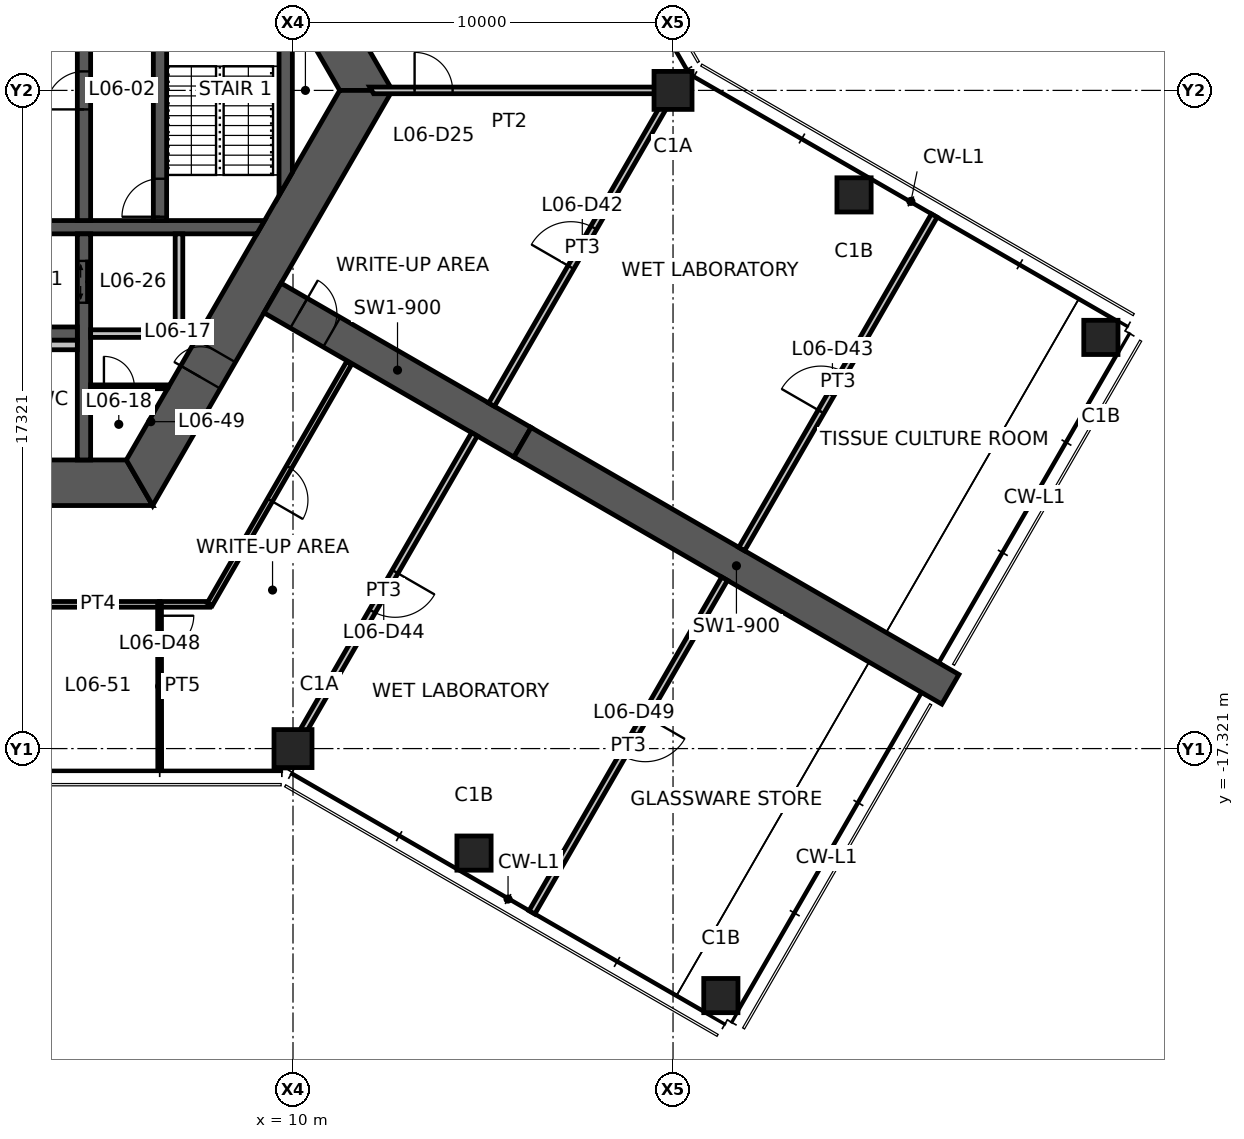
"""IFC4 building model, lengths in metres.
Left out: names, types, materials, properties, quantities, classifications, styles, units other than length and angle.
Written with IfcOpenShell. Run it as: python <this file> out.ifc"""

import sys

from ifc_helpers import new_model, si_unit, direction, frame, frame_2d, origin, origin_2d, place, context, subcontext, project, spatial, polyline, rectangle, hollow_rectangle, outline, extrude, element, fill, save


model = new_model("IFC4")
c1 = context("Model", 3, precision=1e-05, world=origin(), true_north=direction((0.0, 1.0)))
c2 = subcontext(c1, "Body", "Model", "MODEL_VIEW")
j1 = project(units=[si_unit("LENGTHUNIT", "METRE"), si_unit("PLANEANGLEUNIT", "RADIAN")], contexts=[c1])
p1 = place(None, origin())
s1 = spatial("IfcSite", under=j1, at=p1, CompositionType="ELEMENT")
p2 = place(p1, origin())
s2 = spatial("IfcBuilding", under=s1, at=p2, CompositionType="ELEMENT")
p3 = place(p2, frame((0.0, 0.0, 22.6)))
s3 = spatial("IfcBuildingStorey", under=s2, at=p3, CompositionType="ELEMENT", Elevation=22.6)
for number, where, z_axis, x_axis in (
    (1, (20.0, 0.0, 0.0), (0.0, 0.0, 1.0), (1.0, 0.0, 0.0)),
    (2, (10.0, -17.321, 0.0), (0.0, 0.0, 1.0), (1.0, 0.0, 0.0)),
):
    element("IfcColumn", number, at=place(p3, frame(where, z_axis=z_axis, x_axis=x_axis)), inside=s3, PredefinedType="COLUMN", context=c2, shape_type="SweptSolid", body=[
        extrude(hollow_rectangle(XDim=1.0, YDim=1.0, WallThickness=0.06, at=origin_2d()), origin(), (0.0, 0.0, 1.0), 4.2),
    ])
for number, where, z_axis, x_axis in (
    (3, (14.763, -20.071, 0.0), (0.0, 0.0, 1.0), (1.0, 0.0, 0.0)),
    (4, (21.258, -23.821, 0.0), (0.0, 0.0, 1.0), (1.0, 0.0, 0.0)),
    (5, (24.763, -2.75, 0.0), (0.0, 0.0, 1.0), (1.0, 0.0, 0.0)),
    (6, (31.258, -6.5, 0.0), (0.0, 0.0, 1.0), (1.0, 0.0, 0.0)),
):
    element("IfcColumn", number, at=place(p3, frame(where, z_axis=z_axis, x_axis=x_axis)), inside=s3, PredefinedType="COLUMN", context=c2, shape_type="SweptSolid", body=[
        extrude(hollow_rectangle(XDim=0.9, YDim=0.9, WallThickness=0.05, at=origin_2d()), origin(), (0.0, 0.0, 1.0), 4.2),
    ])
p4 = place(p3, frame((11.922, 0.0, 0.0), z_axis=(0.0, 0.0, 1.0), x_axis=(-0.500004296715, 0.866022923061, 0.0)))
e7 = element("IfcWall", 7, at=p4, inside=s3, PredefinedType="SHEAR", context=c2, shape_type="SweptSolid", body=[
    extrude(outline(polyline([(-0.346, -0.6), (5.835, -0.6), (6.635, -0.6), (12.269, -0.6), (11.576, 0.6), (6.635, 0.6), (5.835, 0.6), (0.346, 0.6), (-0.346, -0.6)])), origin(), (0.0, 0.0, 1.0), 4.2),
])
p5 = place(p4, frame((5.835, 0.0, 0.0)))
e8 = element("IfcOpeningElement", 8, at=p5, cuts=e7, PredefinedType="OPENING", context=c2, shape_type="SweptSolid", body=[
    extrude(rectangle(XDim=0.8, YDim=2.1, at=frame_2d((0.4, 1.05))), frame((0.0, 0.61, 0.0), z_axis=(0.0, -1.0, 0.0), x_axis=(1.0, 0.0, 0.0)), (0.0, 0.0, 1.0), 1.22),
])
p6 = place(p3, frame((-5.961, -10.325, 0.0), z_axis=(0.0, 0.0, 1.0), x_axis=(1.0, 0.0, 0.0)))
e9 = element("IfcWall", 9, at=p6, inside=s3, PredefinedType="SHEAR", context=c2, shape_type="SweptSolid", body=[
    extrude(outline(polyline([(-0.346, -0.6), (5.461, -0.6), (6.461, -0.6), (12.269, -0.6), (11.576, 0.6), (6.461, 0.6), (5.461, 0.6), (0.346, 0.6), (-0.346, -0.6)])), origin(), (0.0, 0.0, 1.0), 4.2),
])
p7 = place(p6, frame((5.461, 0.0, 0.0)))
e10 = element("IfcOpeningElement", 10, at=p7, cuts=e9, PredefinedType="OPENING", context=c2, shape_type="SweptSolid", body=[
    extrude(rectangle(XDim=1.0, YDim=2.1, at=frame_2d((0.5, 1.05))), frame((0.0, 0.61, 0.0), z_axis=(0.0, -1.0, 0.0), x_axis=(1.0, 0.0, 0.0)), (0.0, 0.0, 1.0), 1.22),
])
p8 = place(p3, frame((5.961, -10.325, 0.0), z_axis=(0.0, 0.0, 1.0), x_axis=(0.500004296715, 0.866022923061, 0.0)))
e11 = element("IfcWall", 11, at=p8, inside=s3, PredefinedType="SHEAR", context=c2, shape_type="SweptSolid", body=[
    extrude(outline(polyline([(-0.346, -0.6), (3.208, -0.6), (4.009, -0.6), (12.269, -0.6), (11.576, 0.6), (4.009, 0.6), (3.208, 0.6), (0.346, 0.6), (-0.346, -0.6)])), origin(), (0.0, 0.0, 1.0), 4.2),
])
p9 = place(p8, frame((3.208, 0.0, 0.0)))
e12 = element("IfcOpeningElement", 12, at=p9, cuts=e11, PredefinedType="OPENING", context=c2, shape_type="SweptSolid", body=[
    extrude(rectangle(XDim=0.8, YDim=2.1, at=frame_2d((0.4, 1.05))), frame((0.0, 0.61, 0.0), z_axis=(0.0, -1.0, 0.0), x_axis=(1.0, 0.0, 0.0)), (0.0, 0.0, 1.0), 1.22),
])
p10 = place(p3, frame((9.461, -5.462, 0.0), z_axis=(0.0, 0.0, 1.0), x_axis=(0.866019116917, -0.500010889016, 0.0)))
e13 = element("IfcWall", 13, at=p10, inside=s3, PredefinedType="SHEAR", context=c2, shape_type="SweptSolid", body=[
    extrude(rectangle(XDim=7.595, YDim=0.9, at=frame_2d((3.798, 0.0))), origin(), (0.0, 0.0, 1.0), 4.2),
])
p11 = place(p10, frame((0.8, 0.0, 0.0)))
e14 = element("IfcOpeningElement", 14, at=p11, cuts=e13, PredefinedType="OPENING", context=c2, shape_type="SweptSolid", body=[
    extrude(rectangle(XDim=1.0, YDim=2.1, at=frame_2d((0.5, 1.05))), frame((0.0, 0.46, 0.0), z_axis=(0.0, -1.0, 0.0), x_axis=(1.0, 0.0, 0.0)), (0.0, 0.0, 1.0), 0.92),
])
p12 = place(p3, frame((16.039, -9.26, 0.0), z_axis=(0.0, 0.0, 1.0), x_axis=(0.866024837091, -0.50000098154, 0.0)))
e15 = element("IfcWall", 15, at=p12, inside=s3, PredefinedType="SHEAR", context=c2, shape_type="SweptSolid", body=[
    extrude(rectangle(XDim=13.0, YDim=0.9, at=frame_2d((6.5, 0.0))), origin(), (0.0, 0.0, 1.0), 4.2),
])
p13 = place(p3, frame((1.425, -3.6, 0.0), z_axis=(0.0, 0.0, 1.0), x_axis=(1.0, 0.0, 0.0)))
e16 = element("IfcWall", 16, at=p13, inside=s3, PredefinedType="SHEAR", context=c2, shape_type="SweptSolid", body=[
    extrude(outline(polyline([(0.0, -0.175), (1.125, -0.175), (2.125, -0.175), (7.625, -0.175), (7.827, 0.175), (2.125, 0.175), (1.125, 0.175), (0.0, 0.175), (0.0, -0.175)])), origin(), (0.0, 0.0, 1.0), 4.2),
])
p14 = place(p13, frame((1.125, 0.0, 0.0)))
e17 = element("IfcOpeningElement", 17, at=p14, cuts=e16, PredefinedType="OPENING", context=c2, shape_type="SweptSolid", body=[
    extrude(rectangle(XDim=1.0, YDim=2.1, at=frame_2d((0.5, 1.05))), frame((0.0, 0.185, 0.0), z_axis=(0.0, -1.0, 0.0), x_axis=(1.0, 0.0, 0.0)), (0.0, 0.0, 1.0), 0.37),
])
p15 = place(p3, frame((4.5, -3.425, 0.0), z_axis=(0.0, 0.0, 1.0), x_axis=(0.0, 1.0, 0.0)))
e18 = element("IfcWall", 18, at=p15, inside=s3, PredefinedType="SHEAR", context=c2, shape_type="SweptSolid", body=[
    extrude(rectangle(XDim=6.85, YDim=0.35, at=frame_2d((3.425, 0.0))), origin(), (0.0, 0.0, 1.0), 4.2),
])
p16 = place(p15, frame((2.925, 0.0, 0.0)))
e19 = element("IfcOpeningElement", 19, at=p16, cuts=e18, PredefinedType="OPENING", context=c2, shape_type="SweptSolid", body=[
    extrude(rectangle(XDim=1.0, YDim=2.1, at=frame_2d((0.5, 1.05))), frame((0.0, 0.185, 0.0), z_axis=(0.0, -1.0, 0.0), x_axis=(1.0, 0.0, 0.0)), (0.0, 0.0, 1.0), 0.37),
])
p17 = place(p3, frame((6.5, -3.425, 0.0), z_axis=(0.0, 0.0, 1.0), x_axis=(0.0, 1.0, 0.0)))
e20 = element("IfcWall", 20, at=p17, inside=s3, PredefinedType="SHEAR", context=c2, shape_type="SweptSolid", body=[
    extrude(rectangle(XDim=6.85, YDim=0.35, at=frame_2d((3.425, 0.0))), origin(), (0.0, 0.0, 1.0), 4.2),
])
p18 = place(p17, frame((0.1, 0.0, 0.0)))
e21 = element("IfcOpeningElement", 21, at=p18, cuts=e20, PredefinedType="OPENING", context=c2, shape_type="SweptSolid", body=[
    extrude(rectangle(XDim=1.0, YDim=2.1, at=frame_2d((0.5, 1.05))), frame((0.0, 0.185, 0.0), z_axis=(0.0, -1.0, 0.0), x_axis=(1.0, 0.0, 0.0)), (0.0, 0.0, 1.0), 0.37),
])
p19 = place(p3, frame((4.5, -3.775, 0.0), z_axis=(0.0, 0.0, 1.0), x_axis=(0.0, -1.0, 0.0)))
e22 = element("IfcWall", 22, at=p19, inside=s3, PredefinedType="SHEAR", context=c2, shape_type="SweptSolid", body=[
    extrude(rectangle(XDim=5.95, YDim=0.35, at=frame_2d((2.975, 0.0))), origin(), (0.0, 0.0, 1.0), 4.2),
])
p20 = place(p19, frame((0.712, 0.0, 0.0)))
e23 = element("IfcOpeningElement", 23, at=p20, cuts=e22, PredefinedType="OPENING", context=c2, shape_type="SweptSolid", body=[
    extrude(rectangle(XDim=1.1, YDim=2.1, at=frame_2d((0.55, 1.05))), frame((0.0, 0.185, 0.0), z_axis=(0.0, -1.0, 0.0), x_axis=(1.0, 0.0, 0.0)), (0.0, 0.0, 1.0), 0.37),
])
p21 = place(p3, frame((1.775, -6.4, 0.0), z_axis=(0.0, 0.0, 1.0), x_axis=(1.0, 0.0, 0.0)))
e24 = element("IfcWall", 24, at=p21, inside=s3, PredefinedType="SHEAR", context=c2, shape_type="SweptSolid", body=[
    extrude(rectangle(XDim=2.55, YDim=0.35, at=frame_2d((1.275, 0.0))), origin(), (0.0, 0.0, 1.0), 4.2),
])
p22 = place(p3, frame((9.808, -2.462, 0.0), z_axis=(0.0, 0.0, 1.0), x_axis=(0.0, 1.0, 0.0)))
e25 = element("IfcWall", 25, at=p22, inside=s3, PredefinedType="SHEAR", context=c2, shape_type="SweptSolid", body=[
    extrude(outline(polyline([(0.303, -0.175), (4.621, -0.175), (5.228, 0.175), (-0.303, 0.175), (0.303, -0.175)])), origin(), (0.0, 0.0, 1.0), 4.2),
])
p23 = place(p3, frame((4.675, -6.4, 0.0), z_axis=(0.0, 0.0, 1.0), x_axis=(1.0, 0.0, 0.0)))
e26 = element("IfcWall", 26, at=p23, inside=s3, PredefinedType="STANDARD", context=c2, shape_type="SweptSolid", body=[
    extrude(rectangle(XDim=2.425, YDim=0.2, at=frame_2d((1.212, 0.0))), origin(), (0.0, 0.0, 1.0), 4.2),
])
p24 = place(p3, frame((7.0, -3.775, 0.0), z_axis=(0.0, 0.0, 1.0), x_axis=(0.0, -1.0, 0.0)))
e27 = element("IfcWall", 27, at=p24, inside=s3, PredefinedType="STANDARD", context=c2, shape_type="SweptSolid", body=[
    extrude(rectangle(XDim=2.525, YDim=0.2, at=frame_2d((1.263, 0.0))), origin(), (0.0, 0.0, 1.0), 4.2),
])
p25 = place(p3, frame((1.775, -6.7, 0.0), z_axis=(0.0, 0.0, 1.0), x_axis=(1.0, 0.0, 0.0)))
e28 = element("IfcWall", 28, at=p25, inside=s3, PredefinedType="PLUMBINGWALL", context=c2, shape_type="SweptSolid", body=[
    extrude(rectangle(XDim=2.55, YDim=0.25, at=frame_2d((1.275, 0.0))), origin(), (0.0, 0.0, 1.0), 4.2),
])
p26 = place(p3, frame((4.675, -7.8, 0.0), z_axis=(0.0, 0.0, 1.0), x_axis=(1.0, 0.0, 0.0)))
e29 = element("IfcWall", 29, at=p26, inside=s3, PredefinedType="PARTITIONING", context=c2, shape_type="SweptSolid", body=[
    extrude(outline(polyline([(0.0, -0.05), (0.35, -0.05), (1.15, -0.05), (2.022, -0.05), (2.051, 0.0), (2.057, 0.05), (1.15, 0.05), (0.35, 0.05), (0.0, 0.05), (0.0, -0.05)])), origin(), (0.0, 0.0, 1.0), 3.2),
])
p27 = place(p26, frame((0.35, 0.0, 0.0)))
e30 = element("IfcOpeningElement", 30, at=p27, cuts=e29, PredefinedType="OPENING", context=c2, shape_type="SweptSolid", body=[
    extrude(rectangle(XDim=0.8, YDim=2.1, at=frame_2d((0.4, 1.05))), frame((0.0, 0.06, 0.0), z_axis=(0.0, -1.0, 0.0), x_axis=(1.0, 0.0, 0.0)), (0.0, 0.0, 1.0), 0.12),
])
p28 = place(p3, frame((12.07, 0.0, 0.0), z_axis=(0.0, 0.0, 1.0), x_axis=(1.0, 0.0, 0.0)))
e31 = element("IfcWall", 31, at=p28, inside=s3, PredefinedType="PARTITIONING", context=c2, shape_type="SweptSolid", body=[
    extrude(outline(polyline([(0.051, -0.087), (1.129, -0.087), (2.129, -0.087), (7.93, -0.087), (7.93, 0.087), (2.129, 0.087), (1.129, 0.087), (-0.051, 0.087), (0.051, -0.087)])), origin(), (0.0, 0.0, 1.0), 3.3),
])
p29 = place(p28, frame((1.129, 0.0, 0.0)))
e32 = element("IfcOpeningElement", 32, at=p29, cuts=e31, PredefinedType="OPENING", context=c2, shape_type="SweptSolid", body=[
    extrude(rectangle(XDim=1.0, YDim=2.1, at=frame_2d((0.5, 1.05))), frame((0.0, 0.098, 0.0), z_axis=(0.0, -1.0, 0.0), x_axis=(1.0, 0.0, 0.0)), (0.0, 0.0, 1.0), 0.195),
])
p30 = place(p3, frame((15.225, -8.271, 0.0), z_axis=(0.0, 0.0, 1.0), x_axis=(0.499993908199, 0.866028920859, 0.0)))
e33 = element("IfcWall", 33, at=p30, inside=s3, PredefinedType="PARTITIONING", context=c2, shape_type="SweptSolid", body=[
    extrude(rectangle(XDim=9.55, YDim=0.175, at=frame_2d((4.775, 0.0))), origin(), (0.0, 0.0, 1.0), 3.208),
])
p31 = place(p30, frame((4.175, 0.0, 0.0)))
e34 = element("IfcOpeningElement", 34, at=p31, cuts=e33, PredefinedType="OPENING", context=c2, shape_type="SweptSolid", body=[
    extrude(rectangle(XDim=1.2, YDim=2.1, at=frame_2d((0.6, 1.05))), frame((0.0, 0.098, 0.0), z_axis=(0.0, -1.0, 0.0), x_axis=(1.0, 0.0, 0.0)), (0.0, 0.0, 1.0), 0.195),
])
p32 = place(p3, frame((21.807, -12.071, 0.0), z_axis=(0.0, 0.0, 1.0), x_axis=(0.499994227129, 0.866028736727, 0.0)))
e35 = element("IfcWall", 35, at=p32, inside=s3, PredefinedType="PARTITIONING", context=c2, shape_type="SweptSolid", body=[
    extrude(rectangle(XDim=10.135, YDim=0.175, at=frame_2d((5.067, 0.0))), origin(), (0.0, 0.0, 1.0), 4.0),
])
p33 = place(p32, frame((4.175, 0.0, 0.0)))
e36 = element("IfcOpeningElement", 36, at=p33, cuts=e35, PredefinedType="OPENING", context=c2, shape_type="SweptSolid", body=[
    extrude(rectangle(XDim=1.2, YDim=2.1, at=frame_2d((0.6, 1.05))), frame((0.0, 0.098, 0.0), z_axis=(0.0, -1.0, 0.0), x_axis=(1.0, 0.0, 0.0)), (0.0, 0.0, 1.0), 0.195),
])
p34 = place(p3, frame((14.775, -9.05, 0.0), z_axis=(0.0, 0.0, 1.0), x_axis=(-0.499993908199, -0.866028920859, 0.0)))
e37 = element("IfcWall", 37, at=p34, inside=s3, PredefinedType="PARTITIONING", context=c2, shape_type="SweptSolid", body=[
    extrude(rectangle(XDim=9.55, YDim=0.175, at=frame_2d((4.775, 0.0))), origin(), (0.0, 0.0, 1.0), 3.208),
])
p35 = place(p34, frame((4.175, 0.0, 0.0)))
e38 = element("IfcOpeningElement", 38, at=p35, cuts=e37, PredefinedType="OPENING", context=c2, shape_type="SweptSolid", body=[
    extrude(rectangle(XDim=1.2, YDim=2.1, at=frame_2d((0.6, 1.05))), frame((0.0, 0.098, 0.0), z_axis=(0.0, -1.0, 0.0), x_axis=(1.0, 0.0, 0.0)), (0.0, 0.0, 1.0), 0.195),
])
p36 = place(p3, frame((6.498, -13.525, 0.0), z_axis=(0.0, 0.0, 1.0), x_axis=(-1.0, 0.0, 0.0)))
e39 = element("IfcWall", 39, at=p36, inside=s3, PredefinedType="PARTITIONING", context=c2, shape_type="SweptSolid", body=[
    extrude(rectangle(XDim=3.256, YDim=0.15, at=frame_2d((1.628, 0.0))), origin(), (0.0, 0.0, 1.0), 3.2),
])
p37 = place(p3, frame((7.809, -13.525, 0.0), z_axis=(0.0, 0.0, 1.0), x_axis=(-1.0, 0.0, 0.0)))
e40 = element("IfcWall", 40, at=p37, inside=s3, PredefinedType="PARTITIONING", context=c2, shape_type="SweptSolid", body=[
    extrude(rectangle(XDim=1.32, YDim=0.15, at=frame_2d((0.66, 0.0))), origin(), (0.0, 0.0, 1.0), 3.2),
])
p38 = place(p3, frame((11.478, -7.169, 0.0), z_axis=(0.0, 0.0, 1.0), x_axis=(-0.500010424145, -0.866019385318, 0.0)))
e41 = element("IfcWall", 41, at=p38, inside=s3, PredefinedType="PARTITIONING", context=c2, shape_type="SweptSolid", body=[
    extrude(rectangle(XDim=7.339, YDim=0.15, at=frame_2d((3.669, 0.0))), origin(), (0.0, 0.0, 1.0), 3.2),
])
p39 = place(p38, frame((3.169, 0.0, 0.0)))
e42 = element("IfcOpeningElement", 42, at=p39, cuts=e41, PredefinedType="OPENING", context=c2, shape_type="SweptSolid", body=[
    extrude(rectangle(XDim=1.0, YDim=2.1, at=frame_2d((0.5, 1.05))), frame((0.0, 0.085, 0.0), z_axis=(0.0, -1.0, 0.0), x_axis=(1.0, 0.0, 0.0)), (0.0, 0.0, 1.0), 0.17),
])
p40 = place(p3, frame((6.488, -13.525, 0.0), z_axis=(0.0, 0.0, 1.0), x_axis=(0.001076120809, -0.999999420982, 0.0)))
e43 = element("IfcWall", 43, at=p40, inside=s3, PredefinedType="PARTITIONING", context=c2, shape_type="SweptSolid", body=[
    extrude(rectangle(XDim=4.311, YDim=0.1, at=frame_2d((2.155, 0.0))), origin(), (0.0, 0.0, 1.0), 3.2),
])
p41 = place(p40, frame((0.3, 0.0, 0.0)))
e44 = element("IfcOpeningElement", 44, at=p41, cuts=e43, PredefinedType="OPENING", context=c2, shape_type="SweptSolid", body=[
    extrude(rectangle(XDim=0.9, YDim=2.1, at=frame_2d((0.45, 1.05))), frame((0.0, 0.06, 0.0), z_axis=(0.0, -1.0, 0.0), x_axis=(1.0, 0.0, 0.0)), (0.0, 0.0, 1.0), 0.12),
])
p42 = place(p3, frame((21.357, -12.85, 0.0), z_axis=(0.0, 0.0, 1.0), x_axis=(-0.499987145745, -0.866032825065, 0.0)))
e45 = element("IfcWall", 45, at=p42, inside=s3, PredefinedType="PARTITIONING", context=c2, shape_type="SweptSolid", body=[
    extrude(rectangle(XDim=10.14, YDim=0.175, at=frame_2d((5.07, 0.0))), origin(), (0.0, 0.0, 1.0), 4.0),
])
p43 = place(p42, frame((4.175, 0.0, 0.0)))
e46 = element("IfcOpeningElement", 46, at=p43, cuts=e45, PredefinedType="OPENING", context=c2, shape_type="SweptSolid", body=[
    extrude(rectangle(XDim=1.2, YDim=2.1, at=frame_2d((0.6, 1.05))), frame((0.0, 0.098, 0.0), z_axis=(0.0, -1.0, 0.0), x_axis=(1.0, 0.0, 0.0)), (0.0, 0.0, 1.0), 0.195),
])
p44 = place(p9, origin())
e47 = element("IfcDoor", 47, at=p44, inside=s3, OperationType="SINGLE_SWING_LEFT", PredefinedType="DOOR", context=c2, shape_type="SweptSolid", body=[
    extrude(rectangle(XDim=0.8, YDim=2.1, at=frame_2d((0.4, 1.05))), frame((0.0, 0.025, 0.0), z_axis=(0.0, -1.0, 0.0), x_axis=(1.0, 0.0, 0.0)), (0.0, 0.0, 1.0), 0.05),
])
fill(e12, e47)
p45 = place(p16, origin())
e48 = element("IfcDoor", 48, at=p45, inside=s3, OperationType="SINGLE_SWING_LEFT", PredefinedType="DOOR", context=c2, shape_type="SweptSolid", body=[
    extrude(rectangle(XDim=1.0, YDim=2.1, at=frame_2d((0.5, 1.05))), frame((0.0, 0.025, 0.0), z_axis=(0.0, -1.0, 0.0), x_axis=(1.0, 0.0, 0.0)), (0.0, 0.0, 1.0), 0.05),
])
fill(e19, e48)
p46 = place(p18, origin())
e49 = element("IfcDoor", 49, at=p46, inside=s3, OperationType="SINGLE_SWING_LEFT", PredefinedType="DOOR", context=c2, shape_type="SweptSolid", body=[
    extrude(rectangle(XDim=1.0, YDim=2.1, at=frame_2d((0.5, 1.05))), frame((0.0, 0.025, 0.0), z_axis=(0.0, -1.0, 0.0), x_axis=(1.0, 0.0, 0.0)), (0.0, 0.0, 1.0), 0.05),
])
fill(e21, e49)
p47 = place(p11, origin())
e50 = element("IfcDoor", 50, at=p47, inside=s3, OperationType="SINGLE_SWING_LEFT", PredefinedType="DOOR", context=c2, shape_type="SweptSolid", body=[
    extrude(rectangle(XDim=1.0, YDim=2.1, at=frame_2d((0.5, 1.05))), frame((0.0, 0.025, 0.0), z_axis=(0.0, -1.0, 0.0), x_axis=(1.0, 0.0, 0.0)), (0.0, 0.0, 1.0), 0.05),
])
fill(e14, e50)
p48 = place(p27, origin())
e51 = element("IfcDoor", 51, at=p48, inside=s3, OperationType="SINGLE_SWING_LEFT", PredefinedType="DOOR", context=c2, shape_type="SweptSolid", body=[
    extrude(rectangle(XDim=0.8, YDim=2.1, at=frame_2d((0.4, 1.05))), frame((0.0, 0.025, 0.0), z_axis=(0.0, -1.0, 0.0), x_axis=(1.0, 0.0, 0.0)), (0.0, 0.0, 1.0), 0.05),
])
fill(e30, e51)
p49 = place(p29, origin())
e52 = element("IfcDoor", 52, at=p49, inside=s3, OperationType="SINGLE_SWING_LEFT", PredefinedType="DOOR", context=c2, shape_type="SweptSolid", body=[
    extrude(rectangle(XDim=1.0, YDim=2.1, at=frame_2d((0.5, 1.05))), frame((0.0, 0.025, 0.0), z_axis=(0.0, -1.0, 0.0), x_axis=(1.0, 0.0, 0.0)), (0.0, 0.0, 1.0), 0.05),
])
fill(e32, e52)
p50 = place(p31, origin())
e53 = element("IfcDoor", 53, at=p50, inside=s3, OperationType="DOUBLE_DOOR_SINGLE_SWING", PredefinedType="DOOR", context=c2, shape_type="SweptSolid", body=[
    extrude(rectangle(XDim=1.2, YDim=2.1, at=frame_2d((0.6, 1.05))), frame((0.0, 0.025, 0.0), z_axis=(0.0, -1.0, 0.0), x_axis=(1.0, 0.0, 0.0)), (0.0, 0.0, 1.0), 0.05),
])
fill(e34, e53)
p51 = place(p33, origin())
e54 = element("IfcDoor", 54, at=p51, inside=s3, OperationType="DOUBLE_DOOR_SINGLE_SWING", PredefinedType="DOOR", context=c2, shape_type="SweptSolid", body=[
    extrude(rectangle(XDim=1.2, YDim=2.1, at=frame_2d((0.6, 1.05))), frame((0.0, 0.025, 0.0), z_axis=(0.0, -1.0, 0.0), x_axis=(1.0, 0.0, 0.0)), (0.0, 0.0, 1.0), 0.05),
])
fill(e36, e54)
p52 = place(p35, origin())
e55 = element("IfcDoor", 55, at=p52, inside=s3, OperationType="DOUBLE_DOOR_SINGLE_SWING", PredefinedType="DOOR", context=c2, shape_type="SweptSolid", body=[
    extrude(rectangle(XDim=1.2, YDim=2.1, at=frame_2d((0.6, 1.05))), frame((0.0, 0.025, 0.0), z_axis=(0.0, -1.0, 0.0), x_axis=(1.0, 0.0, 0.0)), (0.0, 0.0, 1.0), 0.05),
])
fill(e38, e55)
p53 = place(p39, origin())
e56 = element("IfcDoor", 56, at=p53, inside=s3, OperationType="SINGLE_SWING_RIGHT", PredefinedType="DOOR", context=c2, shape_type="SweptSolid", body=[
    extrude(rectangle(XDim=1.0, YDim=2.1, at=frame_2d((0.5, 1.05))), frame((0.0, 0.025, 0.0), z_axis=(0.0, -1.0, 0.0), x_axis=(1.0, 0.0, 0.0)), (0.0, 0.0, 1.0), 0.05),
])
fill(e42, e56)
p54 = place(p41, origin())
e57 = element("IfcDoor", 57, at=p54, inside=s3, OperationType="SINGLE_SWING_LEFT", PredefinedType="DOOR", context=c2, shape_type="SweptSolid", body=[
    extrude(rectangle(XDim=0.9, YDim=2.1, at=frame_2d((0.45, 1.05))), frame((0.0, 0.025, 0.0), z_axis=(0.0, -1.0, 0.0), x_axis=(1.0, 0.0, 0.0)), (0.0, 0.0, 1.0), 0.05),
])
fill(e44, e57)
p55 = place(p43, origin())
e58 = element("IfcDoor", 58, at=p55, inside=s3, OperationType="DOUBLE_DOOR_SINGLE_SWING", PredefinedType="DOOR", context=c2, shape_type="SweptSolid", body=[
    extrude(rectangle(XDim=1.2, YDim=2.1, at=frame_2d((0.6, 1.05))), frame((0.0, 0.025, 0.0), z_axis=(0.0, -1.0, 0.0), x_axis=(1.0, 0.0, 0.0)), (0.0, 0.0, 1.0), 0.05),
])
fill(e46, e58)
p56 = place(p20, origin())
e59 = element("IfcDoor", 59, at=p56, inside=s3, OperationType="DOUBLE_DOOR_SLIDING", PredefinedType="DOOR", context=c2, shape_type="SweptSolid", body=[
    extrude(rectangle(XDim=1.1, YDim=2.1, at=frame_2d((0.55, 1.05))), frame((0.0, 0.025, 0.0), z_axis=(0.0, -1.0, 0.0), x_axis=(1.0, 0.0, 0.0)), (0.0, 0.0, 1.0), 0.05),
])
fill(e23, e59)
save(model, sys.argv[1])
